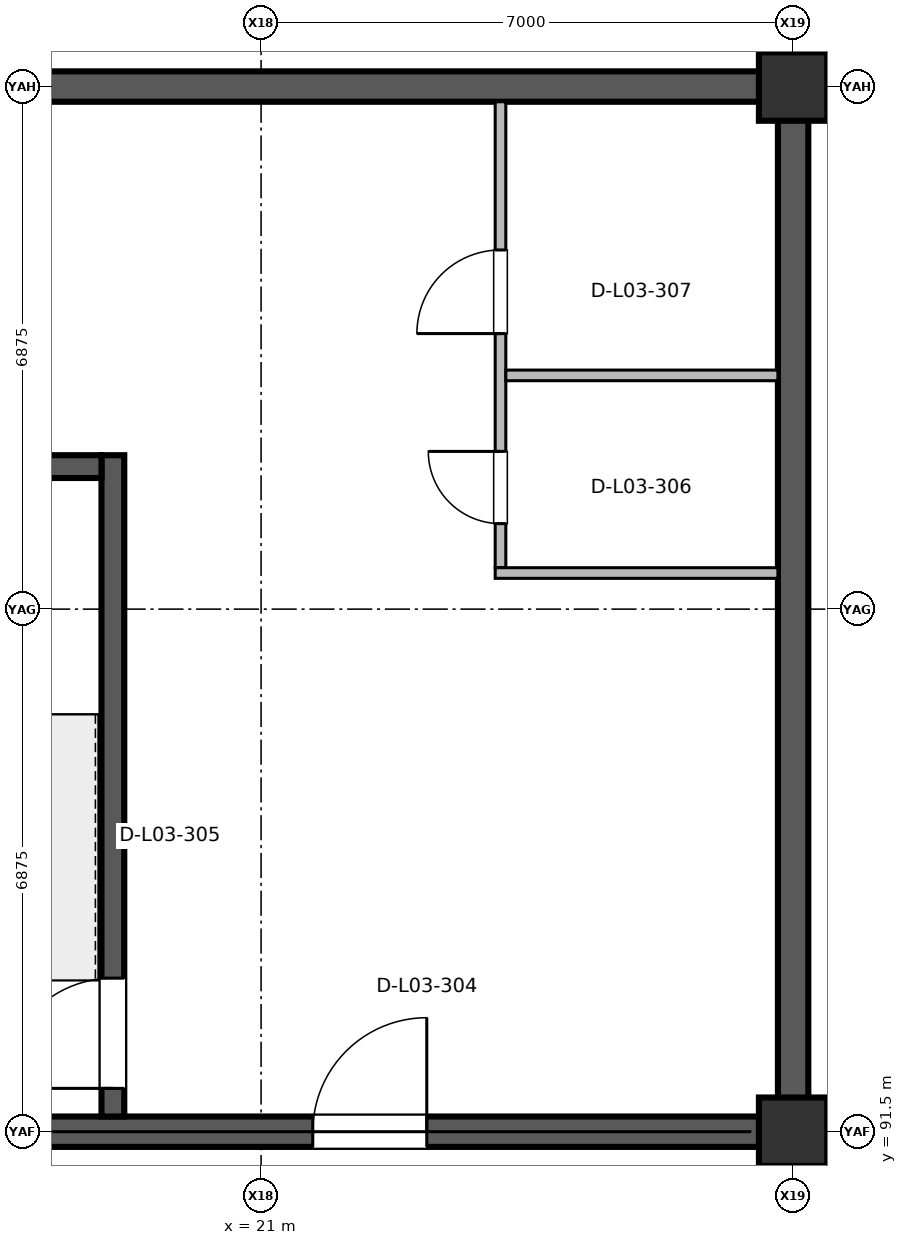
"""IFC4 building model, lengths in metres.
Left out: names, types, materials, properties, quantities, classifications, styles, units other than length and angle.
Written with IfcOpenShell. Run it as: python <this file> out.ifc"""

import sys

from ifc_helpers import new_model, si_unit, direction, frame, frame_2d, origin, origin_2d, place, context, subcontext, project, spatial, rectangle, circle, extrude, element, fill, save


model = new_model("IFC4")
c1 = context("Model", 3, precision=1e-05, world=origin(), true_north=direction((0.0, 1.0)))
c2 = subcontext(c1, "Body", "Model", "MODEL_VIEW")
j1 = project(units=[si_unit("LENGTHUNIT", "METRE"), si_unit("PLANEANGLEUNIT", "RADIAN")], contexts=[c1])
p1 = place(None, origin())
s1 = spatial("IfcSite", under=j1, at=p1, CompositionType="ELEMENT")
p2 = place(p1, origin())
s2 = spatial("IfcBuilding", under=s1, at=p2, CompositionType="ELEMENT")
p3 = place(p2, frame((0.0, 0.0, 11.4)))
s3 = spatial("IfcBuildingStorey", under=s2, at=p3, CompositionType="ELEMENT", Elevation=11.4)
for number, where, z_axis, x_axis in (
    (1, (28.0, 91.5, 0.0), (0.0, 0.0, 1.0), (1.0, 0.0, 0.0)),
    (2, (28.0, 105.25, 0.0), (0.0, 0.0, 1.0), (1.0, 0.0, 0.0)),
):
    element("IfcColumn", number, at=place(p3, frame(where, z_axis=z_axis, x_axis=x_axis)), inside=s3, PredefinedType="COLUMN", context=c2, shape_type="SweptSolid", body=[
        extrude(circle(Radius=0.45, at=origin_2d()), origin(), (0.0, 0.0, 1.0), 4.798),
    ])
p4 = place(p3, frame((28.0, 91.7, 0.0), z_axis=(0.0, 0.0, 1.0), x_axis=(0.0, 1.0, 0.0)))
e3 = element("IfcWall", 3, at=p4, inside=s3, PredefinedType="SHEAR", context=c2, shape_type="SweptSolid", body=[
    extrude(rectangle(XDim=13.35, YDim=0.4, at=frame_2d((6.675, 0.0))), origin(), (0.0, 0.0, 1.0), 4.6),
])
p5 = place(p3, frame((14.2, 91.5, 0.0), z_axis=(0.0, 0.0, 1.0), x_axis=(1.0, 0.0, 0.0)))
e4 = element("IfcWall", 4, at=p5, inside=s3, PredefinedType="SHEAR", context=c2, shape_type="SweptSolid", body=[
    extrude(rectangle(XDim=13.6, YDim=0.4, at=frame_2d((6.8, 0.0))), origin(), (0.0, 0.0, 1.0), 4.6),
])
p6 = place(p5, frame((7.48, 0.0, 0.0)))
e5 = element("IfcOpeningElement", 5, at=p6, cuts=e4, PredefinedType="OPENING", context=c2, shape_type="SweptSolid", body=[
    extrude(rectangle(XDim=1.5, YDim=2.2, at=frame_2d((0.75, 1.1))), frame((0.0, 0.21, 0.0), z_axis=(0.0, -1.0, 0.0), x_axis=(1.0, 0.0, 0.0)), (0.0, 0.0, 1.0), 0.42),
])
p7 = place(p3, frame((14.2, 105.25, 0.0), z_axis=(0.0, 0.0, 1.0), x_axis=(1.0, 0.0, 0.0)))
e6 = element("IfcWall", 6, at=p7, inside=s3, PredefinedType="SHEAR", context=c2, shape_type="SweptSolid", body=[
    extrude(rectangle(XDim=13.6, YDim=0.4, at=frame_2d((6.8, 0.0))), origin(), (0.0, 0.0, 1.0), 4.6),
])
p8 = place(p3, frame((19.05, 91.7, 0.0), z_axis=(0.0, 0.0, 1.0), x_axis=(0.0, 1.0, 0.0)))
e7 = element("IfcWall", 7, at=p8, inside=s3, PredefinedType="SHEAR", context=c2, shape_type="SweptSolid", body=[
    extrude(rectangle(XDim=8.7, YDim=0.3, at=frame_2d((4.35, 0.0))), origin(), (0.0, 0.0, 1.0), 4.6),
])
p9 = place(p8, frame((0.37, 0.0, 0.0)))
e8 = element("IfcOpeningElement", 8, at=p9, cuts=e7, PredefinedType="OPENING", context=c2, shape_type="SweptSolid", body=[
    extrude(rectangle(XDim=1.45, YDim=2.2, at=frame_2d((0.725, 1.1))), frame((0.0, 0.16, 0.0), z_axis=(0.0, -1.0, 0.0), x_axis=(1.0, 0.0, 0.0)), (0.0, 0.0, 1.0), 0.32),
])
p10 = place(p3, frame((24.15, 98.92, 0.0), z_axis=(0.0, 0.0, 1.0), x_axis=(0.0, 1.0, 0.0)))
e9 = element("IfcWall", 9, at=p10, inside=s3, PredefinedType="PARTITIONING", context=c2, shape_type="SweptSolid", body=[
    extrude(rectangle(XDim=6.13, YDim=0.14, at=frame_2d((3.065, 0.0))), origin(), (0.0, 0.0, 1.0), 3.82),
])
p11 = place(p10, frame((0.58, 0.0, 0.0)))
e10 = element("IfcOpeningElement", 10, at=p11, cuts=e9, PredefinedType="OPENING", context=c2, shape_type="SweptSolid", body=[
    extrude(rectangle(XDim=0.95, YDim=2.15, at=frame_2d((0.475, 1.075))), frame((0.0, 0.08, 0.0), z_axis=(0.0, -1.0, 0.0), x_axis=(1.0, 0.0, 0.0)), (0.0, 0.0, 1.0), 0.16),
])
p12 = place(p10, frame((3.08, 0.0, 0.0)))
e11 = element("IfcOpeningElement", 11, at=p12, cuts=e9, PredefinedType="OPENING", context=c2, shape_type="SweptSolid", body=[
    extrude(rectangle(XDim=1.1, YDim=2.15, at=frame_2d((0.55, 1.075))), frame((0.0, 0.08, 0.0), z_axis=(0.0, -1.0, 0.0), x_axis=(1.0, 0.0, 0.0)), (0.0, 0.0, 1.0), 0.16),
])
p13 = place(p3, frame((24.08, 98.85, 0.0), z_axis=(0.0, 0.0, 1.0), x_axis=(1.0, 0.0, 0.0)))
e12 = element("IfcWall", 12, at=p13, inside=s3, PredefinedType="PARTITIONING", context=c2, shape_type="SweptSolid", body=[
    extrude(rectangle(XDim=3.72, YDim=0.14, at=frame_2d((1.86, 0.0))), origin(), (0.0, 0.0, 1.0), 3.82),
])
p14 = place(p3, frame((24.22, 101.45, 0.0), z_axis=(0.0, 0.0, 1.0), x_axis=(1.0, 0.0, 0.0)))
e13 = element("IfcWall", 13, at=p14, inside=s3, PredefinedType="PARTITIONING", context=c2, shape_type="SweptSolid", body=[
    extrude(rectangle(XDim=3.58, YDim=0.14, at=frame_2d((1.79, 0.0))), origin(), (0.0, 0.0, 1.0), 3.82),
])
p15 = place(p3, frame((14.2, 100.25, 0.0), z_axis=(0.0, 0.0, 1.0), x_axis=(1.0, 0.0, 0.0)))
e14 = element("IfcWall", 14, at=p15, inside=s3, PredefinedType="SHEAR", context=c2, shape_type="SweptSolid", body=[
    extrude(rectangle(XDim=4.7, YDim=0.3, at=frame_2d((2.35, 0.0))), origin(), (0.0, 0.0, 1.0), 4.6),
])
p16 = place(p6, origin())
e15 = element("IfcDoor", 15, at=p16, inside=s3, OperationType="SINGLE_SWING_RIGHT", PredefinedType="DOOR", context=c2, shape_type="SweptSolid", body=[
    extrude(rectangle(XDim=1.5, YDim=2.2, at=frame_2d((0.75, 1.1))), frame((0.0, 0.025, 0.0), z_axis=(0.0, -1.0, 0.0), x_axis=(1.0, 0.0, 0.0)), (0.0, 0.0, 1.0), 0.05),
])
fill(e5, e15)
p17 = place(p9, origin())
e16 = element("IfcDoor", 16, at=p17, inside=s3, OperationType="SINGLE_SWING_LEFT", PredefinedType="DOOR", context=c2, shape_type="SweptSolid", body=[
    extrude(rectangle(XDim=1.45, YDim=2.2, at=frame_2d((0.725, 1.1))), frame((0.0, 0.025, 0.0), z_axis=(0.0, -1.0, 0.0), x_axis=(1.0, 0.0, 0.0)), (0.0, 0.0, 1.0), 0.05),
])
fill(e8, e16)
p18 = place(p11, origin())
e17 = element("IfcDoor", 17, at=p18, inside=s3, OperationType="SINGLE_SWING_RIGHT", PredefinedType="DOOR", context=c2, shape_type="SweptSolid", body=[
    extrude(rectangle(XDim=0.95, YDim=2.15, at=frame_2d((0.475, 1.075))), frame((0.0, 0.025, 0.0), z_axis=(0.0, -1.0, 0.0), x_axis=(1.0, 0.0, 0.0)), (0.0, 0.0, 1.0), 0.05),
])
fill(e10, e17)
p19 = place(p12, origin())
e18 = element("IfcDoor", 18, at=p19, inside=s3, OperationType="SINGLE_SWING_LEFT", PredefinedType="DOOR", context=c2, shape_type="SweptSolid", body=[
    extrude(rectangle(XDim=1.1, YDim=2.15, at=frame_2d((0.55, 1.075))), frame((0.0, 0.025, 0.0), z_axis=(0.0, -1.0, 0.0), x_axis=(1.0, 0.0, 0.0)), (0.0, 0.0, 1.0), 0.05),
])
fill(e11, e18)
save(model, sys.argv[1])
